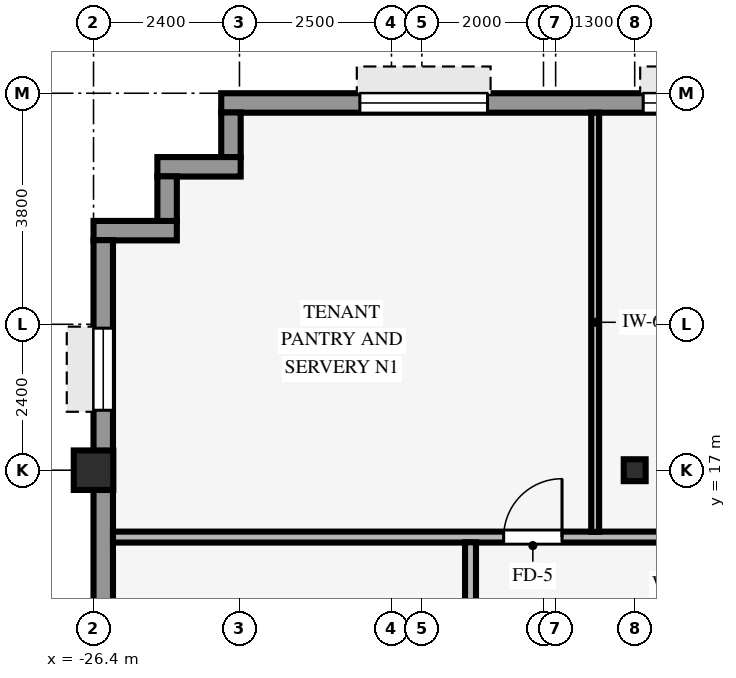
"""IFC4 building model, lengths in metres.
Left out: names, types, materials, properties, quantities, classifications, styles, units other than length and angle.
Written with IfcOpenShell. Run it as: python <this file> out.ifc"""

import sys

from ifc_helpers import new_model, si_unit, direction, frame, frame_2d, origin, origin_2d, place, context, subcontext, project, spatial, rectangle, hollow_rectangle, i_section, extrude, source, transform, mapped, element, fill, save


model = new_model("IFC4")
c1 = context("Model", 3, precision=1e-05, world=origin(), true_north=direction((0.0, 1.0)))
c2 = subcontext(c1, "Body", "Model", "MODEL_VIEW")
j1 = project(units=[si_unit("LENGTHUNIT", "METRE"), si_unit("PLANEANGLEUNIT", "RADIAN")], contexts=[c1])
p1 = place(None, origin())
s1 = spatial("IfcSite", under=j1, at=p1, CompositionType="ELEMENT")
p2 = place(p1, origin())
s2 = spatial("IfcBuilding", under=s1, at=p2, CompositionType="ELEMENT")
p3 = place(p2, frame((0.0, 0.0, 160.35)))
s3 = spatial("IfcBuildingStorey", under=s2, at=p3, CompositionType="ELEMENT", Elevation=160.35)
p4 = place(p3, frame((-26.4, 17.0, 0.0), z_axis=(0.0, 0.0, 1.0), x_axis=(1.0, 0.0, 0.0)))
e1 = element("IfcColumn", 1, at=p4, inside=s3, PredefinedType="COLUMN", context=c2, shape_type="SweptSolid", body=[
    extrude(hollow_rectangle(XDim=0.65, YDim=0.65, WallThickness=0.04, InnerFilletRadius=0.04, OuterFilletRadius=0.08, at=origin_2d()), origin(), (0.0, 0.0, 1.0), 3.37),
])
p5 = place(p3, frame((-17.5, 17.0, 0.0), z_axis=(0.0, 0.0, 1.0), x_axis=(1.0, 0.0, 0.0)))
e2 = element("IfcColumn", 2, at=p5, inside=s3, PredefinedType="COLUMN", context=c2, shape_type="SweptSolid", body=[
    extrude(i_section(OverallWidth=0.36, OverallDepth=0.36, WebThickness=0.021, FlangeThickness=0.021, FilletRadius=0.018, at=origin_2d()), origin(), (0.0, 0.0, 1.0), 3.37),
])
p6 = place(p3, frame((-24.3, 23.04, 0.0), z_axis=(0.0, 0.0, 1.0), x_axis=(1.0, 0.0, 0.0)))
e3 = element("IfcWall", 3, at=p6, inside=s3, PredefinedType="STANDARD", context=c2, shape_type="SweptSolid", body=[
    extrude(rectangle(XDim=48.6, YDim=0.32, at=frame_2d((24.3, 0.0))), origin(), (0.0, 0.0, 1.0), 2.705),
])
p7 = place(p6, frame((28.5, 0.0, 0.0)))
e4 = element("IfcOpeningElement", 4, at=p7, cuts=e3, PredefinedType="OPENING", context=c2, shape_type="SweptSolid", body=[
    extrude(rectangle(XDim=1.05, YDim=2.1, at=frame_2d((0.525, 1.05))), frame((0.0, 0.17, 0.0), z_axis=(0.0, -1.0, 0.0), x_axis=(1.0, 0.0, 0.0)), (0.0, 0.0, 1.0), 0.34),
])
p8 = place(p6, frame((2.28, 0.0, 0.8)))
e5 = element("IfcOpeningElement", 5, at=p8, cuts=e3, PredefinedType="OPENING", context=c2, shape_type="SweptSolid", body=[
    extrude(rectangle(XDim=2.1, YDim=1.56, at=frame_2d((1.05, 0.78))), frame((0.0, 0.17, 0.0), z_axis=(0.0, -1.0, 0.0), x_axis=(1.0, 0.0, 0.0)), (0.0, 0.0, 1.0), 0.34),
])
p9 = place(p6, frame((6.94, 0.0, 0.8)))
e6 = element("IfcOpeningElement", 6, at=p9, cuts=e3, PredefinedType="OPENING", context=c2, shape_type="SweptSolid", body=[
    extrude(rectangle(XDim=2.1, YDim=1.56, at=frame_2d((1.05, 0.78))), frame((0.0, 0.17, 0.0), z_axis=(0.0, -1.0, 0.0), x_axis=(1.0, 0.0, 0.0)), (0.0, 0.0, 1.0), 0.34),
])
p10 = place(p6, frame((11.6, 0.0, 0.8)))
e7 = element("IfcOpeningElement", 7, at=p10, cuts=e3, PredefinedType="OPENING", context=c2, shape_type="SweptSolid", body=[
    extrude(rectangle(XDim=2.1, YDim=1.56, at=frame_2d((1.05, 0.78))), frame((0.0, 0.17, 0.0), z_axis=(0.0, -1.0, 0.0), x_axis=(1.0, 0.0, 0.0)), (0.0, 0.0, 1.0), 0.34),
])
p11 = place(p6, frame((17.61, 0.0, 0.8)))
e8 = element("IfcOpeningElement", 8, at=p11, cuts=e3, PredefinedType="OPENING", context=c2, shape_type="SweptSolid", body=[
    extrude(rectangle(XDim=2.1, YDim=1.56, at=frame_2d((1.05, 0.78))), frame((0.0, 0.17, 0.0), z_axis=(0.0, -1.0, 0.0), x_axis=(1.0, 0.0, 0.0)), (0.0, 0.0, 1.0), 0.34),
])
p12 = place(p6, frame((20.92, 0.0, 0.8)))
e9 = element("IfcOpeningElement", 9, at=p12, cuts=e3, PredefinedType="OPENING", context=c2, shape_type="SweptSolid", body=[
    extrude(rectangle(XDim=2.1, YDim=1.56, at=frame_2d((1.05, 0.78))), frame((0.0, 0.17, 0.0), z_axis=(0.0, -1.0, 0.0), x_axis=(1.0, 0.0, 0.0)), (0.0, 0.0, 1.0), 0.34),
])
p13 = place(p6, frame((25.58, 0.0, 0.8)))
e10 = element("IfcOpeningElement", 10, at=p13, cuts=e3, PredefinedType="OPENING", context=c2, shape_type="SweptSolid", body=[
    extrude(rectangle(XDim=2.1, YDim=1.56, at=frame_2d((1.05, 0.78))), frame((0.0, 0.17, 0.0), z_axis=(0.0, -1.0, 0.0), x_axis=(1.0, 0.0, 0.0)), (0.0, 0.0, 1.0), 0.34),
])
p14 = place(p6, frame((34.9, 0.0, 0.8)))
e11 = element("IfcOpeningElement", 11, at=p14, cuts=e3, PredefinedType="OPENING", context=c2, shape_type="SweptSolid", body=[
    extrude(rectangle(XDim=2.1, YDim=1.56, at=frame_2d((1.05, 0.78))), frame((0.0, 0.17, 0.0), z_axis=(0.0, -1.0, 0.0), x_axis=(1.0, 0.0, 0.0)), (0.0, 0.0, 1.0), 0.34),
])
p15 = place(p6, frame((39.56, 0.0, 0.8)))
e12 = element("IfcOpeningElement", 12, at=p15, cuts=e3, PredefinedType="OPENING", context=c2, shape_type="SweptSolid", body=[
    extrude(rectangle(XDim=2.1, YDim=1.56, at=frame_2d((1.05, 0.78))), frame((0.0, 0.17, 0.0), z_axis=(0.0, -1.0, 0.0), x_axis=(1.0, 0.0, 0.0)), (0.0, 0.0, 1.0), 0.34),
])
p16 = place(p6, frame((44.22, 0.0, 0.8)))
e13 = element("IfcOpeningElement", 13, at=p16, cuts=e3, PredefinedType="OPENING", context=c2, shape_type="SweptSolid", body=[
    extrude(rectangle(XDim=2.1, YDim=1.56, at=frame_2d((1.05, 0.78))), frame((0.0, 0.17, 0.0), z_axis=(0.0, -1.0, 0.0), x_axis=(1.0, 0.0, 0.0)), (0.0, 0.0, 1.0), 0.34),
])
p17 = place(p3, frame((-24.14, 22.146, 0.0), z_axis=(0.0, 0.0, 1.0), x_axis=(0.0, 1.0, 0.0)))
e14 = element("IfcWall", 14, at=p17, inside=s3, PredefinedType="STANDARD", context=c2, shape_type="SweptSolid", body=[
    extrude(rectangle(XDim=0.738, YDim=0.32, at=frame_2d((0.369, 0.0))), origin(), (0.0, 0.0, 1.0), 3.36),
])
p18 = place(p3, frame((-25.35, 21.99, 0.0), z_axis=(0.0, 0.0, 1.0), x_axis=(1.0, 0.0, 0.0)))
e15 = element("IfcWall", 15, at=p18, inside=s3, PredefinedType="STANDARD", context=c2, shape_type="SweptSolid", body=[
    extrude(rectangle(XDim=1.37, YDim=0.32, at=frame_2d((0.685, 0.0))), origin(), (0.0, 0.0, 1.0), 3.36),
])
p19 = place(p3, frame((-25.19, 21.096, 0.0), z_axis=(0.0, 0.0, 1.0), x_axis=(0.0, 1.0, 0.0)))
e16 = element("IfcWall", 16, at=p19, inside=s3, PredefinedType="STANDARD", context=c2, shape_type="SweptSolid", body=[
    extrude(rectangle(XDim=0.738, YDim=0.32, at=frame_2d((0.369, 0.0))), origin(), (0.0, 0.0, 1.0), 3.36),
])
p20 = place(p3, frame((-26.4, 20.94, 0.0), z_axis=(0.0, 0.0, 1.0), x_axis=(1.0, 0.0, 0.0)))
e17 = element("IfcWall", 17, at=p20, inside=s3, PredefinedType="STANDARD", context=c2, shape_type="SweptSolid", body=[
    extrude(rectangle(XDim=1.37, YDim=0.32, at=frame_2d((0.685, 0.0))), origin(), (0.0, 0.0, 1.0), 3.36),
])
p21 = place(p3, frame((-26.24, -20.784, 0.0), z_axis=(0.0, 0.0, 1.0), x_axis=(0.0, 1.0, 0.0)))
e18 = element("IfcWall", 18, at=p21, inside=s3, PredefinedType="STANDARD", context=c2, shape_type="SweptSolid", body=[
    extrude(rectangle(XDim=41.568, YDim=0.32, at=frame_2d((20.784, 0.0))), origin(), (0.0, 0.0, 1.0), 2.705),
])
p22 = place(p21, frame((1.448, 0.0, 0.8)))
e19 = element("IfcOpeningElement", 19, at=p22, cuts=e18, PredefinedType="OPENING", context=c2, shape_type="SweptSolid", body=[
    extrude(rectangle(XDim=1.35, YDim=1.56, at=frame_2d((0.675, 0.78))), frame((0.0, 0.17, 0.0), z_axis=(0.0, -1.0, 0.0), x_axis=(1.0, 0.0, 0.0)), (0.0, 0.0, 1.0), 0.34),
])
p23 = place(p21, frame((7.744, 0.0, 0.8)))
e20 = element("IfcOpeningElement", 20, at=p23, cuts=e18, PredefinedType="OPENING", context=c2, shape_type="SweptSolid", body=[
    extrude(rectangle(XDim=1.35, YDim=1.56, at=frame_2d((0.675, 0.78))), frame((0.0, 0.17, 0.0), z_axis=(0.0, -1.0, 0.0), x_axis=(1.0, 0.0, 0.0)), (0.0, 0.0, 1.0), 0.34),
])
p24 = place(p21, frame((13.14, 0.0, 0.8)))
e21 = element("IfcOpeningElement", 21, at=p24, cuts=e18, PredefinedType="OPENING", context=c2, shape_type="SweptSolid", body=[
    extrude(rectangle(XDim=1.35, YDim=1.56, at=frame_2d((0.675, 0.78))), frame((0.0, 0.17, 0.0), z_axis=(0.0, -1.0, 0.0), x_axis=(1.0, 0.0, 0.0)), (0.0, 0.0, 1.0), 0.34),
])
p25 = place(p21, frame((17.636, 0.0, 0.8)))
e22 = element("IfcOpeningElement", 22, at=p25, cuts=e18, PredefinedType="OPENING", context=c2, shape_type="SweptSolid", body=[
    extrude(rectangle(XDim=1.35, YDim=1.56, at=frame_2d((0.675, 0.78))), frame((0.0, 0.17, 0.0), z_axis=(0.0, -1.0, 0.0), x_axis=(1.0, 0.0, 0.0)), (0.0, 0.0, 1.0), 0.34),
])
p26 = place(p21, frame((22.582, 0.0, 0.8)))
e23 = element("IfcOpeningElement", 23, at=p26, cuts=e18, PredefinedType="OPENING", context=c2, shape_type="SweptSolid", body=[
    extrude(rectangle(XDim=1.35, YDim=1.56, at=frame_2d((0.675, 0.78))), frame((0.0, 0.17, 0.0), z_axis=(0.0, -1.0, 0.0), x_axis=(1.0, 0.0, 0.0)), (0.0, 0.0, 1.0), 0.34),
])
p27 = place(p21, frame((27.078, 0.0, 0.8)))
e24 = element("IfcOpeningElement", 24, at=p27, cuts=e18, PredefinedType="OPENING", context=c2, shape_type="SweptSolid", body=[
    extrude(rectangle(XDim=1.35, YDim=1.56, at=frame_2d((0.675, 0.78))), frame((0.0, 0.17, 0.0), z_axis=(0.0, -1.0, 0.0), x_axis=(1.0, 0.0, 0.0)), (0.0, 0.0, 1.0), 0.34),
])
p28 = place(p21, frame((32.474, 0.0, 0.8)))
e25 = element("IfcOpeningElement", 25, at=p28, cuts=e18, PredefinedType="OPENING", context=c2, shape_type="SweptSolid", body=[
    extrude(rectangle(XDim=1.35, YDim=1.56, at=frame_2d((0.675, 0.78))), frame((0.0, 0.17, 0.0), z_axis=(0.0, -1.0, 0.0), x_axis=(1.0, 0.0, 0.0)), (0.0, 0.0, 1.0), 0.34),
])
p29 = place(p21, frame((38.77, 0.0, 0.8)))
e26 = element("IfcOpeningElement", 26, at=p29, cuts=e18, PredefinedType="OPENING", context=c2, shape_type="SweptSolid", body=[
    extrude(rectangle(XDim=1.35, YDim=1.56, at=frame_2d((0.675, 0.78))), frame((0.0, 0.17, 0.0), z_axis=(0.0, -1.0, 0.0), x_axis=(1.0, 0.0, 0.0)), (0.0, 0.0, 1.0), 0.34),
])
p30 = place(p3, frame((-26.08, 15.9, 0.0), z_axis=(0.0, 0.0, 1.0), x_axis=(1.0, 0.0, 0.0)))
e27 = element("IfcWall", 27, at=p30, inside=s3, PredefinedType="PARTITIONING", context=c2, shape_type="SweptSolid", body=[
    extrude(rectangle(XDim=52.16, YDim=0.18, at=frame_2d((26.08, 0.0))), origin(), (0.0, 0.0, 1.0), 3.36),
])
p31 = place(p30, frame((24.5, 0.0, 0.0)))
e28 = element("IfcOpeningElement", 28, at=p31, cuts=e27, PredefinedType="OPENING", context=c2, shape_type="SweptSolid", body=[
    extrude(rectangle(XDim=0.96, YDim=2.1, at=frame_2d((0.48, 1.05))), frame((0.0, 0.1, 0.0), z_axis=(0.0, -1.0, 0.0), x_axis=(1.0, 0.0, 0.0)), (0.0, 0.0, 1.0), 0.2),
])
p32 = place(p30, frame((40.5, 0.0, 0.0)))
e29 = element("IfcOpeningElement", 29, at=p32, cuts=e27, PredefinedType="OPENING", context=c2, shape_type="SweptSolid", body=[
    extrude(rectangle(XDim=0.96, YDim=2.1, at=frame_2d((0.48, 1.05))), frame((0.0, 0.1, 0.0), z_axis=(0.0, -1.0, 0.0), x_axis=(1.0, 0.0, 0.0)), (0.0, 0.0, 1.0), 0.2),
])
p33 = place(p30, frame((13.16, 0.0, 0.0)))
e30 = element("IfcOpeningElement", 30, at=p33, cuts=e27, PredefinedType="OPENING", context=c2, shape_type="SweptSolid", body=[
    extrude(rectangle(XDim=0.96, YDim=2.1, at=frame_2d((0.48, 1.05))), frame((0.0, 0.1, 0.0), z_axis=(0.0, -1.0, 0.0), x_axis=(1.0, 0.0, 0.0)), (0.0, 0.0, 1.0), 0.2),
])
p34 = place(p30, frame((6.425, 0.0, 0.0)))
e31 = element("IfcOpeningElement", 31, at=p34, cuts=e27, PredefinedType="OPENING", context=c2, shape_type="SweptSolid", body=[
    extrude(rectangle(XDim=0.96, YDim=2.1, at=frame_2d((0.48, 1.05))), frame((0.0, 0.1, 0.0), z_axis=(0.0, -1.0, 0.0), x_axis=(1.0, 0.0, 0.0)), (0.0, 0.0, 1.0), 0.2),
])
p35 = place(p3, frame((-20.2, -15.814, 0.0), z_axis=(0.0, 0.0, 1.0), x_axis=(0.0, 1.0, 0.0)))
e32 = element("IfcWall", 32, at=p35, inside=s3, PredefinedType="PARTITIONING", context=c2, shape_type="SweptSolid", body=[
    extrude(rectangle(XDim=31.628, YDim=0.18, at=frame_2d((15.814, 0.0))), origin(), (0.0, 0.0, 1.0), 3.36),
])
p36 = place(p35, frame((11.434, 0.0, 0.0)))
e33 = element("IfcOpeningElement", 33, at=p36, cuts=e32, PredefinedType="OPENING", context=c2, shape_type="SweptSolid", body=[
    extrude(rectangle(XDim=0.96, YDim=2.1, at=frame_2d((0.48, 1.05))), frame((0.0, 0.1, 0.0), z_axis=(0.0, -1.0, 0.0), x_axis=(1.0, 0.0, 0.0)), (0.0, 0.0, 1.0), 0.2),
])
p37 = place(p35, frame((19.634, 0.0, 0.0)))
e34 = element("IfcOpeningElement", 34, at=p37, cuts=e32, PredefinedType="OPENING", context=c2, shape_type="SweptSolid", body=[
    extrude(rectangle(XDim=0.96, YDim=2.1, at=frame_2d((0.48, 1.05))), frame((0.0, 0.1, 0.0), z_axis=(0.0, -1.0, 0.0), x_axis=(1.0, 0.0, 0.0)), (0.0, 0.0, 1.0), 0.2),
])
p38 = place(p35, frame((4.484, 0.0, 0.0)))
e35 = element("IfcOpeningElement", 35, at=p38, cuts=e32, PredefinedType="OPENING", context=c2, shape_type="SweptSolid", body=[
    extrude(rectangle(XDim=0.96, YDim=2.1, at=frame_2d((0.48, 1.05))), frame((0.0, 0.1, 0.0), z_axis=(0.0, -1.0, 0.0), x_axis=(1.0, 0.0, 0.0)), (0.0, 0.0, 1.0), 0.2),
])
p39 = place(p35, frame((26.184, 0.0, 0.0)))
e36 = element("IfcOpeningElement", 36, at=p39, cuts=e32, PredefinedType="OPENING", context=c2, shape_type="SweptSolid", body=[
    extrude(rectangle(XDim=0.96, YDim=2.1, at=frame_2d((0.48, 1.05))), frame((0.0, 0.1, 0.0), z_axis=(0.0, -1.0, 0.0), x_axis=(1.0, 0.0, 0.0)), (0.0, 0.0, 1.0), 0.2),
])
p40 = place(p3, frame((-18.15, 15.986, 0.0), z_axis=(0.0, 0.0, 1.0), x_axis=(0.0, 1.0, 0.0)))
e37 = element("IfcWall", 37, at=p40, inside=s3, PredefinedType="PARTITIONING", context=c2, shape_type="SweptSolid", body=[
    extrude(rectangle(XDim=6.894, YDim=0.13, at=frame_2d((3.447, 0.0))), origin(), (0.0, 0.0, 1.0), 3.36),
])
m1 = source(origin(), c2, "Body", "SweptSolid", [
    extrude(rectangle(XDim=2.1, YDim=1.56, at=frame_2d((1.05, 0.78))), frame((0.0, 0.03, 0.0), z_axis=(0.0, -1.0, 0.0), x_axis=(1.0, 0.0, 0.0)), (0.0, 0.0, 1.0), 0.06),
])
p41 = place(p8, origin())
e38 = element("IfcWindow", 38, at=p41, inside=s3, PartitioningType="SINGLE_PANEL", PredefinedType="WINDOW", context=c2, shape_type="MappedRepresentation", body=[
    mapped(m1, transform((0.0, 0.0, 0.0), scale=1.0)),
])
fill(e5, e38)
p42 = place(p9, origin())
e39 = element("IfcWindow", 39, at=p42, inside=s3, PartitioningType="SINGLE_PANEL", PredefinedType="WINDOW", context=c2, shape_type="MappedRepresentation", body=[
    mapped(m1, transform((0.0, 0.0, 0.0), scale=1.0)),
])
fill(e6, e39)
m2 = source(origin(), c2, "Body", "SweptSolid", [
    extrude(rectangle(XDim=1.35, YDim=1.56, at=frame_2d((0.675, 0.78))), frame((0.0, 0.03, 0.0), z_axis=(0.0, -1.0, 0.0), x_axis=(1.0, 0.0, 0.0)), (0.0, 0.0, 1.0), 0.06),
])
p43 = place(p29, origin())
e40 = element("IfcWindow", 40, at=p43, inside=s3, PartitioningType="SINGLE_PANEL", PredefinedType="WINDOW", context=c2, shape_type="MappedRepresentation", body=[
    mapped(m2, transform((0.0, 0.0, 0.0), scale=1.0)),
])
fill(e26, e40)
m3 = source(origin(), c2, "Body", "SweptSolid", [
    extrude(rectangle(XDim=0.96, YDim=2.1, at=frame_2d((0.48, 1.05))), frame((0.0, 0.025, 0.0), z_axis=(0.0, -1.0, 0.0), x_axis=(1.0, 0.0, 0.0)), (0.0, 0.0, 1.0), 0.05),
])
p44 = place(p34, origin())
e41 = element("IfcDoor", 41, at=p44, inside=s3, OperationType="SINGLE_SWING_RIGHT", PredefinedType="DOOR", context=c2, shape_type="MappedRepresentation", body=[
    mapped(m3, transform((0.0, 0.0, 0.0), scale=1.0)),
])
fill(e31, e41)
save(model, sys.argv[1])
